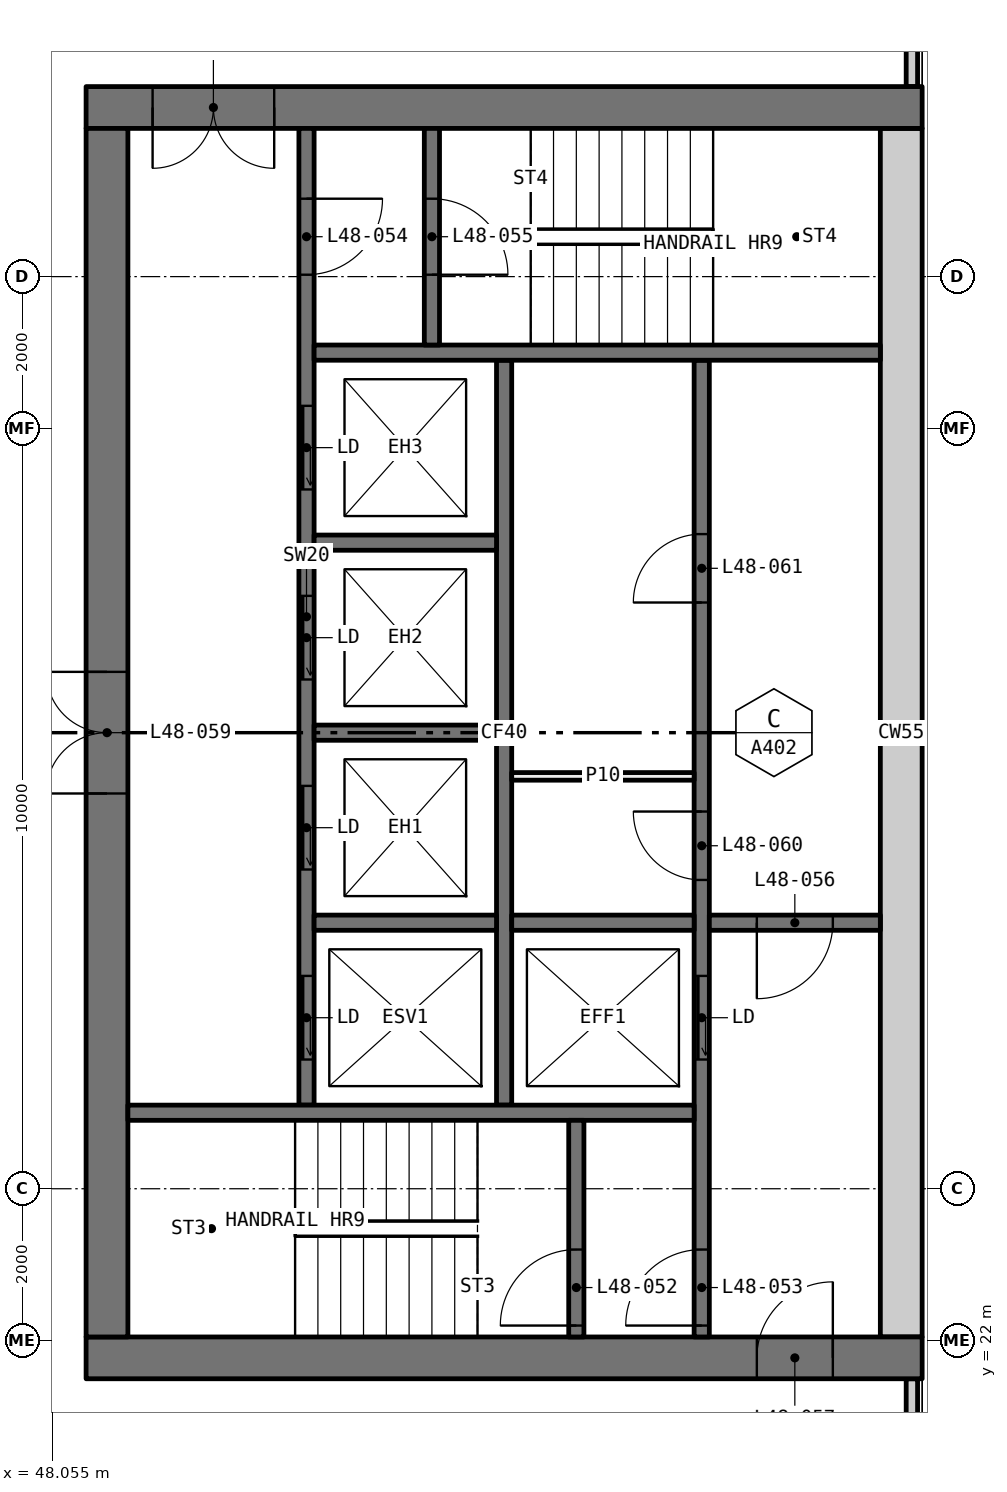
"""IFC4 building model, lengths in metres.
Left out: names, types, materials, properties, quantities, classifications, styles, units other than length and angle.
Written with IfcOpenShell. Run it as: python <this file> out.ifc"""

import sys

from ifc_helpers import new_model, si_unit, direction, frame, frame_2d, origin, place, context, subcontext, project, spatial, rectangle, extrude, element, fill, save


model = new_model("IFC4")
c1 = context("Model", 3, precision=1e-05, world=origin(), true_north=direction((0.0, 1.0)))
c2 = subcontext(c1, "Body", "Model", "MODEL_VIEW")
j1 = project(units=[si_unit("LENGTHUNIT", "METRE"), si_unit("PLANEANGLEUNIT", "RADIAN")], contexts=[c1])
p1 = place(None, origin())
s1 = spatial("IfcSite", under=j1, at=p1, CompositionType="ELEMENT")
p2 = place(p1, origin())
s2 = spatial("IfcBuilding", under=s1, at=p2, CompositionType="ELEMENT")
p3 = place(p2, frame((0.0, 0.0, 182.4)))
s3 = spatial("IfcBuildingStorey", under=s2, at=p3, CompositionType="ELEMENT", Elevation=182.4)
for number, where, z_axis, x_axis in (
    (1, (59.365, 18.71, 0.0), (0.0, 0.0, 1.0), (0.0, 1.0, 0.0)),
    (2, (59.365, 38.5, 0.0), (0.0, 0.0, 1.0), (0.0, 1.0, 0.0)),
):
    element("IfcWall", number, at=place(p3, frame(where, z_axis=z_axis, x_axis=x_axis)), inside=s3, PredefinedType="ELEMENTEDWALL", context=c2, shape_type="SweptSolid", body=[
        extrude(rectangle(XDim=2.79, YDim=0.15, at=frame_2d((1.395, 0.0))), origin(), (0.0, 0.0, 1.0), 3.05),
    ])
p4 = place(p3, frame((59.5, 21.775, 0.0), z_axis=(0.0, 0.0, 1.0), x_axis=(-1.0, 0.0, 0.0)))
e3 = element("IfcWall", 3, at=p4, inside=s3, PredefinedType="SHEAR", context=c2, shape_type="SweptSolid", body=[
    extrude(rectangle(XDim=11.0, YDim=0.55, at=frame_2d((5.5, 0.0))), origin(), (0.0, 0.0, 1.0), 3.05),
])
p5 = place(p4, frame((1.175, 0.0, 0.0)))
e4 = element("IfcOpeningElement", 4, at=p5, cuts=e3, PredefinedType="OPENING", context=c2, shape_type="SweptSolid", body=[
    extrude(rectangle(XDim=1.0, YDim=2.1, at=frame_2d((0.5, 1.05))), frame((0.0, 0.285, 0.0), z_axis=(0.0, -1.0, 0.0), x_axis=(1.0, 0.0, 0.0)), (0.0, 0.0, 1.0), 0.57),
])
p6 = place(p3, frame((59.5, 38.225, 0.0), z_axis=(0.0, 0.0, 1.0), x_axis=(-1.0, 0.0, 0.0)))
e5 = element("IfcWall", 5, at=p6, inside=s3, PredefinedType="SHEAR", context=c2, shape_type="SweptSolid", body=[
    extrude(rectangle(XDim=11.0, YDim=0.55, at=frame_2d((5.5, 0.0))), origin(), (0.0, 0.0, 1.0), 3.05),
])
p7 = place(p6, frame((8.525, 0.0, 0.0)))
e6 = element("IfcOpeningElement", 6, at=p7, cuts=e5, PredefinedType="OPENING", context=c2, shape_type="SweptSolid", body=[
    extrude(rectangle(XDim=1.6, YDim=2.1, at=frame_2d((0.8, 1.05))), frame((0.0, 0.285, 0.0), z_axis=(0.0, -1.0, 0.0), x_axis=(1.0, 0.0, 0.0)), (0.0, 0.0, 1.0), 0.57),
])
p8 = place(p3, frame((59.225, 22.05, 0.0), z_axis=(0.0, 0.0, 1.0), x_axis=(0.0, 1.0, 0.0)))
e7 = element("IfcWall", 7, at=p8, inside=s3, PredefinedType="SHEAR", context=c2, shape_type="SweptSolid", body=[
    extrude(rectangle(XDim=15.9, YDim=0.55, at=frame_2d((7.95, 0.0))), origin(), (0.0, 0.0, 1.0), 3.05),
])
p9 = place(p3, frame((48.775, 22.05, 0.0), z_axis=(0.0, 0.0, 1.0), x_axis=(0.0, 1.0, 0.0)))
e8 = element("IfcWall", 8, at=p9, inside=s3, PredefinedType="SHEAR", context=c2, shape_type="SweptSolid", body=[
    extrude(rectangle(XDim=15.9, YDim=0.55, at=frame_2d((7.95, 0.0))), origin(), (0.0, 0.0, 1.0), 3.05),
])
p10 = place(p9, frame((7.15, 0.0, 0.0)))
e9 = element("IfcOpeningElement", 9, at=p10, cuts=e8, PredefinedType="OPENING", context=c2, shape_type="SweptSolid", body=[
    extrude(rectangle(XDim=1.6, YDim=2.1, at=frame_2d((0.8, 1.05))), frame((0.0, 0.285, 0.0), z_axis=(0.0, -1.0, 0.0), x_axis=(1.0, 0.0, 0.0)), (0.0, 0.0, 1.0), 0.57),
])
p11 = place(p3, frame((56.6, 22.05, 0.0), z_axis=(0.0, 0.0, 1.0), x_axis=(0.0, 1.0, 0.0)))
e10 = element("IfcWall", 10, at=p11, inside=s3, PredefinedType="SOLIDWALL", context=c2, shape_type="SweptSolid", body=[
    extrude(rectangle(XDim=12.85, YDim=0.2, at=frame_2d((6.425, 0.0))), origin(), (0.0, 0.0, 1.0), 3.05),
])
p12 = place(p11, frame((3.65, 0.0, 0.0)))
e11 = element("IfcOpeningElement", 11, at=p12, cuts=e10, PredefinedType="OPENING", context=c2, shape_type="SweptSolid", body=[
    extrude(rectangle(XDim=1.1, YDim=2.1, at=frame_2d((0.55, 1.05))), frame((0.0, 0.11, 0.0), z_axis=(0.0, -1.0, 0.0), x_axis=(1.0, 0.0, 0.0)), (0.0, 0.0, 1.0), 0.22),
])
p13 = place(p11, frame((0.15, 0.0, 0.0)))
e12 = element("IfcOpeningElement", 12, at=p13, cuts=e10, PredefinedType="OPENING", context=c2, shape_type="SweptSolid", body=[
    extrude(rectangle(XDim=1.0, YDim=2.1, at=frame_2d((0.5, 1.05))), frame((0.0, 0.11, 0.0), z_axis=(0.0, -1.0, 0.0), x_axis=(1.0, 0.0, 0.0)), (0.0, 0.0, 1.0), 0.22),
])
p14 = place(p11, frame((6.012, 0.0, 0.0)))
e13 = element("IfcOpeningElement", 13, at=p14, cuts=e10, PredefinedType="OPENING", context=c2, shape_type="SweptSolid", body=[
    extrude(rectangle(XDim=0.9, YDim=2.1, at=frame_2d((0.45, 1.05))), frame((0.0, 0.11, 0.0), z_axis=(0.0, -1.0, 0.0), x_axis=(1.0, 0.0, 0.0)), (0.0, 0.0, 1.0), 0.22),
])
p15 = place(p11, frame((9.663, 0.0, 0.0)))
e14 = element("IfcOpeningElement", 14, at=p15, cuts=e10, PredefinedType="OPENING", context=c2, shape_type="SweptSolid", body=[
    extrude(rectangle(XDim=0.9, YDim=2.1, at=frame_2d((0.45, 1.05))), frame((0.0, 0.11, 0.0), z_axis=(0.0, -1.0, 0.0), x_axis=(1.0, 0.0, 0.0)), (0.0, 0.0, 1.0), 0.22),
])
p16 = place(p3, frame((51.4, 25.1, 0.0), z_axis=(0.0, 0.0, 1.0), x_axis=(0.0, 1.0, 0.0)))
e15 = element("IfcWall", 15, at=p16, inside=s3, PredefinedType="SOLIDWALL", context=c2, shape_type="SweptSolid", body=[
    extrude(rectangle(XDim=12.85, YDim=0.2, at=frame_2d((6.425, 0.0))), origin(), (0.0, 0.0, 1.0), 3.05),
])
p17 = place(p16, frame((0.6, 0.0, 0.0)))
e16 = element("IfcOpeningElement", 16, at=p17, cuts=e15, PredefinedType="OPENING", context=c2, shape_type="SweptSolid", body=[
    extrude(rectangle(XDim=1.1, YDim=2.1, at=frame_2d((0.55, 1.05))), frame((0.0, 0.11, 0.0), z_axis=(0.0, -1.0, 0.0), x_axis=(1.0, 0.0, 0.0)), (0.0, 0.0, 1.0), 0.22),
])
p18 = place(p16, frame((3.1, 0.0, 0.0)))
e17 = element("IfcOpeningElement", 17, at=p18, cuts=e15, PredefinedType="OPENING", context=c2, shape_type="SweptSolid", body=[
    extrude(rectangle(XDim=1.1, YDim=2.1, at=frame_2d((0.55, 1.05))), frame((0.0, 0.11, 0.0), z_axis=(0.0, -1.0, 0.0), x_axis=(1.0, 0.0, 0.0)), (0.0, 0.0, 1.0), 0.22),
])
p19 = place(p16, frame((5.6, 0.0, 0.0)))
e18 = element("IfcOpeningElement", 18, at=p19, cuts=e15, PredefinedType="OPENING", context=c2, shape_type="SweptSolid", body=[
    extrude(rectangle(XDim=1.1, YDim=2.1, at=frame_2d((0.55, 1.05))), frame((0.0, 0.11, 0.0), z_axis=(0.0, -1.0, 0.0), x_axis=(1.0, 0.0, 0.0)), (0.0, 0.0, 1.0), 0.22),
])
p20 = place(p16, frame((8.1, 0.0, 0.0)))
e19 = element("IfcOpeningElement", 19, at=p20, cuts=e15, PredefinedType="OPENING", context=c2, shape_type="SweptSolid", body=[
    extrude(rectangle(XDim=1.1, YDim=2.1, at=frame_2d((0.55, 1.05))), frame((0.0, 0.11, 0.0), z_axis=(0.0, -1.0, 0.0), x_axis=(1.0, 0.0, 0.0)), (0.0, 0.0, 1.0), 0.22),
])
p21 = place(p16, frame((10.925, 0.0, 0.0)))
e20 = element("IfcOpeningElement", 20, at=p21, cuts=e15, PredefinedType="OPENING", context=c2, shape_type="SweptSolid", body=[
    extrude(rectangle(XDim=1.0, YDim=2.1, at=frame_2d((0.5, 1.05))), frame((0.0, 0.11, 0.0), z_axis=(0.0, -1.0, 0.0), x_axis=(1.0, 0.0, 0.0)), (0.0, 0.0, 1.0), 0.22),
])
p22 = place(p3, frame((54.0, 25.1, 0.0), z_axis=(0.0, 0.0, 1.0), x_axis=(0.0, 1.0, 0.0)))
e21 = element("IfcWall", 21, at=p22, inside=s3, PredefinedType="SOLIDWALL", context=c2, shape_type="SweptSolid", body=[
    extrude(rectangle(XDim=9.8, YDim=0.2, at=frame_2d((4.9, 0.0))), origin(), (0.0, 0.0, 1.0), 3.05),
])
for number, where, z_axis, x_axis in (
    (22, (56.5, 25.0, 0.0), (0.0, 0.0, 1.0), (-1.0, 0.0, 0.0)),
    (23, (58.95, 35.0, 0.0), (0.0, 0.0, 1.0), (-1.0, 0.0, 0.0)),
):
    element("IfcWall", number, at=place(p3, frame(where, z_axis=z_axis, x_axis=x_axis)), inside=s3, PredefinedType="SOLIDWALL", context=c2, shape_type="SweptSolid", body=[
        extrude(rectangle(XDim=7.45, YDim=0.2, at=frame_2d((3.725, 0.0))), origin(), (0.0, 0.0, 1.0), 3.05),
    ])
p23 = place(p3, frame((58.95, 27.5, 0.0), z_axis=(0.0, 0.0, 1.0), x_axis=(-1.0, 0.0, 0.0)))
e24 = element("IfcWall", 24, at=p23, inside=s3, PredefinedType="SOLIDWALL", context=c2, shape_type="SweptSolid", body=[
    extrude(rectangle(XDim=2.25, YDim=0.2, at=frame_2d((1.125, 0.0))), origin(), (0.0, 0.0, 1.0), 3.05),
])
p24 = place(p23, frame((0.625, 0.0, 0.0)))
e25 = element("IfcOpeningElement", 25, at=p24, cuts=e24, PredefinedType="OPENING", context=c2, shape_type="SweptSolid", body=[
    extrude(rectangle(XDim=1.0, YDim=2.1, at=frame_2d((0.5, 1.05))), frame((0.0, 0.11, 0.0), z_axis=(0.0, -1.0, 0.0), x_axis=(1.0, 0.0, 0.0)), (0.0, 0.0, 1.0), 0.22),
])
p25 = place(p3, frame((54.95, 22.05, 0.0), z_axis=(0.0, 0.0, 1.0), x_axis=(0.0, 1.0, 0.0)))
e26 = element("IfcWall", 26, at=p25, inside=s3, PredefinedType="SOLIDWALL", context=c2, shape_type="SweptSolid", body=[
    extrude(rectangle(XDim=2.85, YDim=0.2, at=frame_2d((1.425, 0.0))), origin(), (0.0, 0.0, 1.0), 3.05),
])
p26 = place(p25, frame((0.15, 0.0, 0.0)))
e27 = element("IfcOpeningElement", 27, at=p26, cuts=e26, PredefinedType="OPENING", context=c2, shape_type="SweptSolid", body=[
    extrude(rectangle(XDim=1.0, YDim=2.1, at=frame_2d((0.5, 1.05))), frame((0.0, 0.11, 0.0), z_axis=(0.0, -1.0, 0.0), x_axis=(1.0, 0.0, 0.0)), (0.0, 0.0, 1.0), 0.22),
])
p27 = place(p3, frame((53.05, 35.1, 0.0), z_axis=(0.0, 0.0, 1.0), x_axis=(0.0, 1.0, 0.0)))
e28 = element("IfcWall", 28, at=p27, inside=s3, PredefinedType="SOLIDWALL", context=c2, shape_type="SweptSolid", body=[
    extrude(rectangle(XDim=2.85, YDim=0.2, at=frame_2d((1.425, 0.0))), origin(), (0.0, 0.0, 1.0), 3.05),
])
p28 = place(p27, frame((0.925, 0.0, 0.0)))
e29 = element("IfcOpeningElement", 29, at=p28, cuts=e28, PredefinedType="OPENING", context=c2, shape_type="SweptSolid", body=[
    extrude(rectangle(XDim=1.0, YDim=2.1, at=frame_2d((0.5, 1.05))), frame((0.0, 0.11, 0.0), z_axis=(0.0, -1.0, 0.0), x_axis=(1.0, 0.0, 0.0)), (0.0, 0.0, 1.0), 0.22),
])
for number, where, z_axis, x_axis in (
    (30, (56.5, 27.5, 0.0), (0.0, 0.0, 1.0), (-1.0, 0.0, 0.0)),
    (31, (53.9, 27.5, 0.0), (0.0, 0.0, 1.0), (-1.0, 0.0, 0.0)),
    (32, (53.9, 30.0, 0.0), (0.0, 0.0, 1.0), (-1.0, 0.0, 0.0)),
    (33, (53.9, 32.5, 0.0), (0.0, 0.0, 1.0), (-1.0, 0.0, 0.0)),
):
    element("IfcWall", number, at=place(p3, frame(where, z_axis=z_axis, x_axis=x_axis)), inside=s3, PredefinedType="SOLIDWALL", context=c2, shape_type="SweptSolid", body=[
        extrude(rectangle(XDim=2.4, YDim=0.2, at=frame_2d((1.2, 0.0))), origin(), (0.0, 0.0, 1.0), 3.05),
    ])
p29 = place(p3, frame((56.5, 29.425, 0.0), z_axis=(0.0, 0.0, 1.0), x_axis=(-1.0, 0.0, 0.0)))
e34 = element("IfcWall", 34, at=p29, inside=s3, PredefinedType="PARTITIONING", context=c2, shape_type="SweptSolid", body=[
    extrude(rectangle(XDim=2.4, YDim=0.1, at=frame_2d((1.2, 0.0))), origin(), (0.0, 0.0, 1.0), 3.05),
])
p30 = place(p17, origin())
e35 = element("IfcDoor", 35, at=p30, inside=s3, OperationType="SLIDING_TO_LEFT", PredefinedType="DOOR", context=c2, shape_type="SweptSolid", body=[
    extrude(rectangle(XDim=1.1, YDim=2.1, at=frame_2d((0.55, 1.05))), frame((0.0, 0.025, 0.0), z_axis=(0.0, -1.0, 0.0), x_axis=(1.0, 0.0, 0.0)), (0.0, 0.0, 1.0), 0.05),
])
fill(e16, e35)
p31 = place(p18, origin())
e36 = element("IfcDoor", 36, at=p31, inside=s3, OperationType="SLIDING_TO_LEFT", PredefinedType="DOOR", context=c2, shape_type="SweptSolid", body=[
    extrude(rectangle(XDim=1.1, YDim=2.1, at=frame_2d((0.55, 1.05))), frame((0.0, 0.025, 0.0), z_axis=(0.0, -1.0, 0.0), x_axis=(1.0, 0.0, 0.0)), (0.0, 0.0, 1.0), 0.05),
])
fill(e17, e36)
p32 = place(p19, origin())
e37 = element("IfcDoor", 37, at=p32, inside=s3, OperationType="SLIDING_TO_LEFT", PredefinedType="DOOR", context=c2, shape_type="SweptSolid", body=[
    extrude(rectangle(XDim=1.1, YDim=2.1, at=frame_2d((0.55, 1.05))), frame((0.0, 0.025, 0.0), z_axis=(0.0, -1.0, 0.0), x_axis=(1.0, 0.0, 0.0)), (0.0, 0.0, 1.0), 0.05),
])
fill(e18, e37)
p33 = place(p20, origin())
e38 = element("IfcDoor", 38, at=p33, inside=s3, OperationType="SLIDING_TO_LEFT", PredefinedType="DOOR", context=c2, shape_type="SweptSolid", body=[
    extrude(rectangle(XDim=1.1, YDim=2.1, at=frame_2d((0.55, 1.05))), frame((0.0, 0.025, 0.0), z_axis=(0.0, -1.0, 0.0), x_axis=(1.0, 0.0, 0.0)), (0.0, 0.0, 1.0), 0.05),
])
fill(e19, e38)
p34 = place(p12, origin())
e39 = element("IfcDoor", 39, at=p34, inside=s3, OperationType="SLIDING_TO_LEFT", PredefinedType="DOOR", context=c2, shape_type="SweptSolid", body=[
    extrude(rectangle(XDim=1.1, YDim=2.1, at=frame_2d((0.55, 1.05))), frame((0.0, 0.025, 0.0), z_axis=(0.0, -1.0, 0.0), x_axis=(1.0, 0.0, 0.0)), (0.0, 0.0, 1.0), 0.05),
])
fill(e11, e39)
p35 = place(p26, origin())
e40 = element("IfcDoor", 40, at=p35, inside=s3, OperationType="SINGLE_SWING_RIGHT", PredefinedType="DOOR", context=c2, shape_type="SweptSolid", body=[
    extrude(rectangle(XDim=1.0, YDim=2.1, at=frame_2d((0.5, 1.05))), frame((0.0, 0.025, 0.0), z_axis=(0.0, -1.0, 0.0), x_axis=(1.0, 0.0, 0.0)), (0.0, 0.0, 1.0), 0.05),
])
fill(e27, e40)
p36 = place(p13, origin())
e41 = element("IfcDoor", 41, at=p36, inside=s3, OperationType="SINGLE_SWING_RIGHT", PredefinedType="DOOR", context=c2, shape_type="SweptSolid", body=[
    extrude(rectangle(XDim=1.0, YDim=2.1, at=frame_2d((0.5, 1.05))), frame((0.0, 0.025, 0.0), z_axis=(0.0, -1.0, 0.0), x_axis=(1.0, 0.0, 0.0)), (0.0, 0.0, 1.0), 0.05),
])
fill(e12, e41)
p37 = place(p21, frame((1.0, 0.0, 0.0), x_axis=(-1.0, 0.0, 0.0)))
e42 = element("IfcDoor", 42, at=p37, inside=s3, OperationType="SINGLE_SWING_RIGHT", PredefinedType="DOOR", context=c2, shape_type="SweptSolid", body=[
    extrude(rectangle(XDim=1.0, YDim=2.1, at=frame_2d((0.5, 1.05))), frame((0.0, 0.025, 0.0), z_axis=(0.0, -1.0, 0.0), x_axis=(1.0, 0.0, 0.0)), (0.0, 0.0, 1.0), 0.05),
])
fill(e20, e42)
p38 = place(p28, frame((1.0, 0.0, 0.0), x_axis=(-1.0, 0.0, 0.0)))
e43 = element("IfcDoor", 43, at=p38, inside=s3, OperationType="SINGLE_SWING_LEFT", PredefinedType="DOOR", context=c2, shape_type="SweptSolid", body=[
    extrude(rectangle(XDim=1.0, YDim=2.1, at=frame_2d((0.5, 1.05))), frame((0.0, 0.025, 0.0), z_axis=(0.0, -1.0, 0.0), x_axis=(1.0, 0.0, 0.0)), (0.0, 0.0, 1.0), 0.05),
])
fill(e29, e43)
p39 = place(p24, origin())
e44 = element("IfcDoor", 44, at=p39, inside=s3, OperationType="SINGLE_SWING_LEFT", PredefinedType="DOOR", context=c2, shape_type="SweptSolid", body=[
    extrude(rectangle(XDim=1.0, YDim=2.1, at=frame_2d((0.5, 1.05))), frame((0.0, 0.025, 0.0), z_axis=(0.0, -1.0, 0.0), x_axis=(1.0, 0.0, 0.0)), (0.0, 0.0, 1.0), 0.05),
])
fill(e25, e44)
p40 = place(p5, frame((1.0, 0.0, 0.0), x_axis=(-1.0, 0.0, 0.0)))
e45 = element("IfcDoor", 45, at=p40, inside=s3, OperationType="SINGLE_SWING_LEFT", PredefinedType="DOOR", context=c2, shape_type="SweptSolid", body=[
    extrude(rectangle(XDim=1.0, YDim=2.1, at=frame_2d((0.5, 1.05))), frame((0.0, 0.025, 0.0), z_axis=(0.0, -1.0, 0.0), x_axis=(1.0, 0.0, 0.0)), (0.0, 0.0, 1.0), 0.05),
])
fill(e4, e45)
p41 = place(p7, origin())
e46 = element("IfcDoor", 46, at=p41, inside=s3, OperationType="DOUBLE_DOOR_SINGLE_SWING", PredefinedType="DOOR", context=c2, shape_type="SweptSolid", body=[
    extrude(rectangle(XDim=1.6, YDim=2.1, at=frame_2d((0.8, 1.05))), frame((0.0, 0.025, 0.0), z_axis=(0.0, -1.0, 0.0), x_axis=(1.0, 0.0, 0.0)), (0.0, 0.0, 1.0), 0.05),
])
fill(e6, e46)
p42 = place(p10, origin())
e47 = element("IfcDoor", 47, at=p42, inside=s3, OperationType="DOUBLE_DOOR_SINGLE_SWING", PredefinedType="DOOR", context=c2, shape_type="SweptSolid", body=[
    extrude(rectangle(XDim=1.6, YDim=2.1, at=frame_2d((0.8, 1.05))), frame((0.0, 0.025, 0.0), z_axis=(0.0, -1.0, 0.0), x_axis=(1.0, 0.0, 0.0)), (0.0, 0.0, 1.0), 0.05),
])
fill(e9, e47)
p43 = place(p14, origin())
e48 = element("IfcDoor", 48, at=p43, inside=s3, OperationType="SINGLE_SWING_LEFT", PredefinedType="DOOR", context=c2, shape_type="SweptSolid", body=[
    extrude(rectangle(XDim=0.9, YDim=2.1, at=frame_2d((0.45, 1.05))), frame((0.0, 0.025, 0.0), z_axis=(0.0, -1.0, 0.0), x_axis=(1.0, 0.0, 0.0)), (0.0, 0.0, 1.0), 0.05),
])
fill(e13, e48)
p44 = place(p15, origin())
e49 = element("IfcDoor", 49, at=p44, inside=s3, OperationType="SINGLE_SWING_RIGHT", PredefinedType="DOOR", context=c2, shape_type="SweptSolid", body=[
    extrude(rectangle(XDim=0.9, YDim=2.1, at=frame_2d((0.45, 1.05))), frame((0.0, 0.025, 0.0), z_axis=(0.0, -1.0, 0.0), x_axis=(1.0, 0.0, 0.0)), (0.0, 0.0, 1.0), 0.05),
])
fill(e14, e49)
save(model, sys.argv[1])
